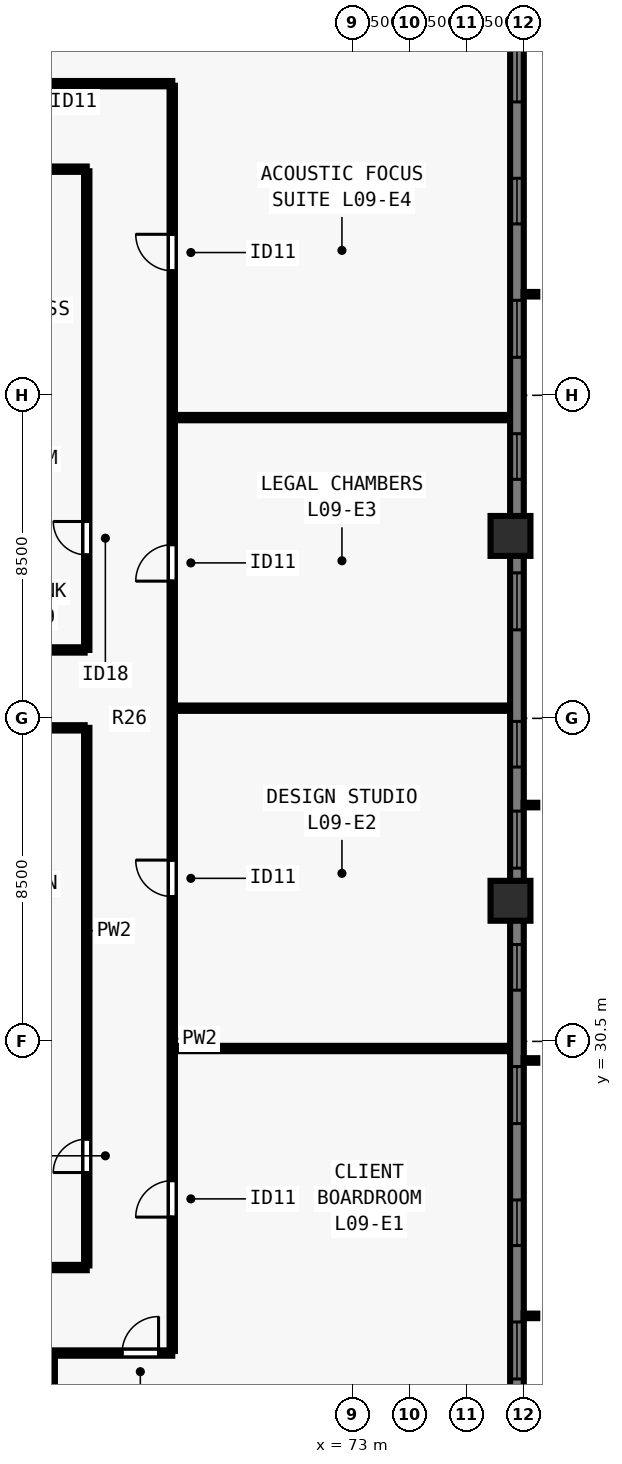
"""IFC4 building model, lengths in metres.
Left out: names, types, materials, properties, quantities, classifications, styles, units other than length and angle.
Written with IfcOpenShell. Run it as: python <this file> out.ifc"""

import sys

from ifc_helpers import new_model, si_unit, direction, frame, frame_2d, origin, origin_2d, place, context, subcontext, project, spatial, rectangle, extrude, element, fill, save


model = new_model("IFC4")
c1 = context("Model", 3, precision=1e-05, world=origin(), true_north=direction((0.0, 1.0)))
c2 = subcontext(c1, "Body", "Model", "MODEL_VIEW")
j1 = project(units=[si_unit("LENGTHUNIT", "METRE"), si_unit("PLANEANGLEUNIT", "RADIAN")], contexts=[c1])
p1 = place(None, origin())
s1 = spatial("IfcSite", under=j1, at=p1, CompositionType="ELEMENT")
p2 = place(p1, origin())
s2 = spatial("IfcBuilding", under=s1, at=p2, CompositionType="ELEMENT")
p3 = place(p2, frame((0.0, 0.0, 37.5)))
s3 = spatial("IfcBuildingStorey", under=s2, at=p3, CompositionType="ELEMENT", Elevation=37.5)
for number, where, z_axis, x_axis in (
    (1, (77.15, 34.2, 0.0), (0.0, 0.0, 1.0), (0.0, 1.0, 0.0)),
    (2, (77.15, 43.8, 0.0), (0.0, 0.0, 1.0), (0.0, 1.0, 0.0)),
):
    element("IfcColumn", number, at=place(p3, frame(where, z_axis=z_axis, x_axis=x_axis)), inside=s3, PredefinedType="COLUMN", context=c2, shape_type="SweptSolid", body=[
        extrude(rectangle(XDim=1.05, YDim=1.05, at=origin_2d()), origin(), (0.0, 0.0, 1.0), 3.5),
    ])
p4 = place(p3, frame((77.32, 61.5, 0.0), z_axis=(0.0, 0.0, 1.0), x_axis=(0.0, -1.0, 0.0)))
e3 = element("IfcWall", 3, at=p4, inside=s3, PredefinedType="SOLIDWALL", context=c2, shape_type="SweptSolid", body=[
    extrude(rectangle(XDim=44.662, YDim=0.36, at=frame_2d((22.331, 0.0))), origin(), (0.0, 0.0, 1.0), 3.28),
])
p5 = place(p4, frame((4.78, 0.0, 0.8)))
e4 = element("IfcOpeningElement", 4, at=p5, cuts=e3, PredefinedType="OPENING", context=c2, shape_type="SweptSolid", body=[
    extrude(rectangle(XDim=1.5, YDim=1.544, at=frame_2d((0.75, 0.772))), frame((0.0, 0.19, 0.0), z_axis=(0.0, -1.0, 0.0), x_axis=(1.0, 0.0, 0.0)), (0.0, 0.0, 1.0), 0.38),
])
p6 = place(p4, frame((8.29, 0.0, 0.8)))
e5 = element("IfcOpeningElement", 5, at=p6, cuts=e3, PredefinedType="OPENING", context=c2, shape_type="SweptSolid", body=[
    extrude(rectangle(XDim=1.2, YDim=1.544, at=frame_2d((0.6, 0.772))), frame((0.0, 0.19, 0.0), z_axis=(0.0, -1.0, 0.0), x_axis=(1.0, 0.0, 0.0)), (0.0, 0.0, 1.0), 0.38),
])
p7 = place(p4, frame((11.5, 0.0, 0.8)))
e6 = element("IfcOpeningElement", 6, at=p7, cuts=e3, PredefinedType="OPENING", context=c2, shape_type="SweptSolid", body=[
    extrude(rectangle(XDim=1.5, YDim=1.544, at=frame_2d((0.75, 0.772))), frame((0.0, 0.19, 0.0), z_axis=(0.0, -1.0, 0.0), x_axis=(1.0, 0.0, 0.0)), (0.0, 0.0, 1.0), 0.38),
])
p8 = place(p4, frame((15.01, 0.0, 0.8)))
e7 = element("IfcOpeningElement", 7, at=p8, cuts=e3, PredefinedType="OPENING", context=c2, shape_type="SweptSolid", body=[
    extrude(rectangle(XDim=1.2, YDim=1.544, at=frame_2d((0.6, 0.772))), frame((0.0, 0.19, 0.0), z_axis=(0.0, -1.0, 0.0), x_axis=(1.0, 0.0, 0.0)), (0.0, 0.0, 1.0), 0.38),
])
p9 = place(p4, frame((18.671, 0.0, 0.8)))
e8 = element("IfcOpeningElement", 8, at=p9, cuts=e3, PredefinedType="OPENING", context=c2, shape_type="SweptSolid", body=[
    extrude(rectangle(XDim=1.5, YDim=1.544, at=frame_2d((0.75, 0.772))), frame((0.0, 0.19, 0.0), z_axis=(0.0, -1.0, 0.0), x_axis=(1.0, 0.0, 0.0)), (0.0, 0.0, 1.0), 0.38),
])
p10 = place(p4, frame((22.581, 0.0, 0.8)))
e9 = element("IfcOpeningElement", 9, at=p10, cuts=e3, PredefinedType="OPENING", context=c2, shape_type="SweptSolid", body=[
    extrude(rectangle(XDim=1.2, YDim=1.544, at=frame_2d((0.6, 0.772))), frame((0.0, 0.19, 0.0), z_axis=(0.0, -1.0, 0.0), x_axis=(1.0, 0.0, 0.0)), (0.0, 0.0, 1.0), 0.38),
])
p11 = place(p4, frame((24.941, 0.0, 0.8)))
e10 = element("IfcOpeningElement", 10, at=p11, cuts=e3, PredefinedType="OPENING", context=c2, shape_type="SweptSolid", body=[
    extrude(rectangle(XDim=1.5, YDim=1.544, at=frame_2d((0.75, 0.772))), frame((0.0, 0.19, 0.0), z_axis=(0.0, -1.0, 0.0), x_axis=(1.0, 0.0, 0.0)), (0.0, 0.0, 1.0), 0.38),
])
p12 = place(p4, frame((28.451, 0.0, 0.8)))
e11 = element("IfcOpeningElement", 11, at=p12, cuts=e3, PredefinedType="OPENING", context=c2, shape_type="SweptSolid", body=[
    extrude(rectangle(XDim=1.2, YDim=1.544, at=frame_2d((0.6, 0.772))), frame((0.0, 0.19, 0.0), z_axis=(0.0, -1.0, 0.0), x_axis=(1.0, 0.0, 0.0)), (0.0, 0.0, 1.0), 0.38),
])
p13 = place(p4, frame((31.662, 0.0, 0.8)))
e12 = element("IfcOpeningElement", 12, at=p13, cuts=e3, PredefinedType="OPENING", context=c2, shape_type="SweptSolid", body=[
    extrude(rectangle(XDim=1.5, YDim=1.544, at=frame_2d((0.75, 0.772))), frame((0.0, 0.19, 0.0), z_axis=(0.0, -1.0, 0.0), x_axis=(1.0, 0.0, 0.0)), (0.0, 0.0, 1.0), 0.38),
])
p14 = place(p4, frame((35.172, 0.0, 0.8)))
e13 = element("IfcOpeningElement", 13, at=p14, cuts=e3, PredefinedType="OPENING", context=c2, shape_type="SweptSolid", body=[
    extrude(rectangle(XDim=1.2, YDim=1.544, at=frame_2d((0.6, 0.772))), frame((0.0, 0.19, 0.0), z_axis=(0.0, -1.0, 0.0), x_axis=(1.0, 0.0, 0.0)), (0.0, 0.0, 1.0), 0.38),
])
p15 = place(p4, frame((38.382, 0.0, 0.8)))
e14 = element("IfcOpeningElement", 14, at=p15, cuts=e3, PredefinedType="OPENING", context=c2, shape_type="SweptSolid", body=[
    extrude(rectangle(XDim=1.5, YDim=1.544, at=frame_2d((0.75, 0.772))), frame((0.0, 0.19, 0.0), z_axis=(0.0, -1.0, 0.0), x_axis=(1.0, 0.0, 0.0)), (0.0, 0.0, 1.0), 0.38),
])
p16 = place(p3, frame((35.75, 22.3, 0.0), z_axis=(0.0, 0.0, 1.0), x_axis=(1.0, 0.0, 0.0)))
e15 = element("IfcWall", 15, at=p16, inside=s3, PredefinedType="PARTITIONING", context=c2, shape_type="SweptSolid", body=[
    extrude(rectangle(XDim=32.5, YDim=0.14, at=frame_2d((16.25, 0.0))), origin(), (0.0, 0.0, 1.0), 3.28),
])
p17 = place(p16, frame((1.604, 0.0, 0.0)))
e16 = element("IfcOpeningElement", 16, at=p17, cuts=e15, PredefinedType="OPENING", context=c2, shape_type="SweptSolid", body=[
    extrude(rectangle(XDim=0.96, YDim=2.12, at=frame_2d((0.48, 1.06))), frame((0.0, 0.08, 0.0), z_axis=(0.0, -1.0, 0.0), x_axis=(1.0, 0.0, 0.0)), (0.0, 0.0, 1.0), 0.16),
])
p18 = place(p16, frame((9.585, 0.0, 0.0)))
e17 = element("IfcOpeningElement", 17, at=p18, cuts=e15, PredefinedType="OPENING", context=c2, shape_type="SweptSolid", body=[
    extrude(rectangle(XDim=0.96, YDim=2.12, at=frame_2d((0.48, 1.06))), frame((0.0, 0.08, 0.0), z_axis=(0.0, -1.0, 0.0), x_axis=(1.0, 0.0, 0.0)), (0.0, 0.0, 1.0), 0.16),
])
p19 = place(p16, frame((22.125, 0.0, 0.0)))
e18 = element("IfcOpeningElement", 18, at=p19, cuts=e15, PredefinedType="OPENING", context=c2, shape_type="SweptSolid", body=[
    extrude(rectangle(XDim=0.96, YDim=2.12, at=frame_2d((0.48, 1.06))), frame((0.0, 0.08, 0.0), z_axis=(0.0, -1.0, 0.0), x_axis=(1.0, 0.0, 0.0)), (0.0, 0.0, 1.0), 0.16),
])
p20 = place(p16, frame((31.18, 0.0, 0.0)))
e19 = element("IfcOpeningElement", 19, at=p20, cuts=e15, PredefinedType="OPENING", context=c2, shape_type="SweptSolid", body=[
    extrude(rectangle(XDim=0.96, YDim=2.12, at=frame_2d((0.48, 1.06))), frame((0.0, 0.08, 0.0), z_axis=(0.0, -1.0, 0.0), x_axis=(1.0, 0.0, 0.0)), (0.0, 0.0, 1.0), 0.16),
])
p21 = place(p3, frame((35.75, 55.7, 0.0), z_axis=(0.0, 0.0, 1.0), x_axis=(1.0, 0.0, 0.0)))
e20 = element("IfcWall", 20, at=p21, inside=s3, PredefinedType="PARTITIONING", context=c2, shape_type="SweptSolid", body=[
    extrude(rectangle(XDim=32.5, YDim=0.14, at=frame_2d((16.25, 0.0))), origin(), (0.0, 0.0, 1.0), 3.28),
])
p22 = place(p21, frame((3.154, 0.0, 0.0)))
e21 = element("IfcOpeningElement", 21, at=p22, cuts=e20, PredefinedType="OPENING", context=c2, shape_type="SweptSolid", body=[
    extrude(rectangle(XDim=0.96, YDim=2.12, at=frame_2d((0.48, 1.06))), frame((0.0, 0.08, 0.0), z_axis=(0.0, -1.0, 0.0), x_axis=(1.0, 0.0, 0.0)), (0.0, 0.0, 1.0), 0.16),
])
p23 = place(p21, frame((27.834, 0.0, 0.0)))
e22 = element("IfcOpeningElement", 22, at=p23, cuts=e20, PredefinedType="OPENING", context=c2, shape_type="SweptSolid", body=[
    extrude(rectangle(XDim=0.96, YDim=2.12, at=frame_2d((0.48, 1.06))), frame((0.0, 0.08, 0.0), z_axis=(0.0, -1.0, 0.0), x_axis=(1.0, 0.0, 0.0)), (0.0, 0.0, 1.0), 0.16),
])
p24 = place(p3, frame((68.25, 22.355, 0.0), z_axis=(0.0, 0.0, 1.0), x_axis=(0.0, 1.0, 0.0)))
e23 = element("IfcWall", 23, at=p24, inside=s3, PredefinedType="PARTITIONING", context=c2, shape_type="SweptSolid", body=[
    extrude(rectangle(XDim=33.29, YDim=0.14, at=frame_2d((16.645, 0.0))), origin(), (0.0, 0.0, 1.0), 3.28),
])
p25 = place(p24, frame((3.522, 0.0, 0.0)))
e24 = element("IfcOpeningElement", 24, at=p25, cuts=e23, PredefinedType="OPENING", context=c2, shape_type="SweptSolid", body=[
    extrude(rectangle(XDim=0.96, YDim=2.12, at=frame_2d((0.48, 1.06))), frame((0.0, 0.08, 0.0), z_axis=(0.0, -1.0, 0.0), x_axis=(1.0, 0.0, 0.0)), (0.0, 0.0, 1.0), 0.16),
])
p26 = place(p24, frame((11.956, 0.0, 0.0)))
e25 = element("IfcOpeningElement", 25, at=p26, cuts=e23, PredefinedType="OPENING", context=c2, shape_type="SweptSolid", body=[
    extrude(rectangle(XDim=0.96, YDim=2.12, at=frame_2d((0.48, 1.06))), frame((0.0, 0.08, 0.0), z_axis=(0.0, -1.0, 0.0), x_axis=(1.0, 0.0, 0.0)), (0.0, 0.0, 1.0), 0.16),
])
p27 = place(p24, frame((20.256, 0.0, 0.0)))
e26 = element("IfcOpeningElement", 26, at=p27, cuts=e23, PredefinedType="OPENING", context=c2, shape_type="SweptSolid", body=[
    extrude(rectangle(XDim=0.96, YDim=2.12, at=frame_2d((0.48, 1.06))), frame((0.0, 0.08, 0.0), z_axis=(0.0, -1.0, 0.0), x_axis=(1.0, 0.0, 0.0)), (0.0, 0.0, 1.0), 0.16),
])
p28 = place(p24, frame((28.422, 0.0, 0.0)))
e27 = element("IfcOpeningElement", 27, at=p28, cuts=e23, PredefinedType="OPENING", context=c2, shape_type="SweptSolid", body=[
    extrude(rectangle(XDim=0.96, YDim=2.12, at=frame_2d((0.48, 1.06))), frame((0.0, 0.08, 0.0), z_axis=(0.0, -1.0, 0.0), x_axis=(1.0, 0.0, 0.0)), (0.0, 0.0, 1.0), 0.16),
])
p29 = place(p3, frame((38.0, 24.55, 0.0), z_axis=(0.0, 0.0, 1.0), x_axis=(1.0, 0.0, 0.0)))
e28 = element("IfcWall", 28, at=p29, inside=s3, PredefinedType="PARTITIONING", context=c2, shape_type="SweptSolid", body=[
    extrude(rectangle(XDim=28.0, YDim=0.14, at=frame_2d((14.0, 0.0))), origin(), (0.0, 0.0, 1.0), 3.28),
])
p30 = place(p29, frame((1.2, 0.0, 0.0)))
e29 = element("IfcOpeningElement", 29, at=p30, cuts=e28, PredefinedType="OPENING", context=c2, shape_type="SweptSolid", body=[
    extrude(rectangle(XDim=0.88, YDim=2.1, at=frame_2d((0.44, 1.05))), frame((0.0, 0.08, 0.0), z_axis=(0.0, -1.0, 0.0), x_axis=(1.0, 0.0, 0.0)), (0.0, 0.0, 1.0), 0.16),
])
p31 = place(p29, frame((10.5, 0.0, 0.0)))
e30 = element("IfcOpeningElement", 30, at=p31, cuts=e28, PredefinedType="OPENING", context=c2, shape_type="SweptSolid", body=[
    extrude(rectangle(XDim=0.88, YDim=2.1, at=frame_2d((0.44, 1.05))), frame((0.0, 0.08, 0.0), z_axis=(0.0, -1.0, 0.0), x_axis=(1.0, 0.0, 0.0)), (0.0, 0.0, 1.0), 0.16),
])
p32 = place(p29, frame((21.0, 0.0, 0.0)))
e31 = element("IfcOpeningElement", 31, at=p32, cuts=e28, PredefinedType="OPENING", context=c2, shape_type="SweptSolid", body=[
    extrude(rectangle(XDim=0.88, YDim=2.1, at=frame_2d((0.44, 1.05))), frame((0.0, 0.08, 0.0), z_axis=(0.0, -1.0, 0.0), x_axis=(1.0, 0.0, 0.0)), (0.0, 0.0, 1.0), 0.16),
])
p33 = place(p3, frame((38.0, 53.45, 0.0), z_axis=(0.0, 0.0, 1.0), x_axis=(1.0, 0.0, 0.0)))
e32 = element("IfcWall", 32, at=p33, inside=s3, PredefinedType="PARTITIONING", context=c2, shape_type="SweptSolid", body=[
    extrude(rectangle(XDim=28.0, YDim=0.14, at=frame_2d((14.0, 0.0))), origin(), (0.0, 0.0, 1.0), 3.28),
])
p34 = place(p33, frame((2.2, 0.0, 0.0)))
e33 = element("IfcOpeningElement", 33, at=p34, cuts=e32, PredefinedType="OPENING", context=c2, shape_type="SweptSolid", body=[
    extrude(rectangle(XDim=0.88, YDim=2.1, at=frame_2d((0.44, 1.05))), frame((0.0, 0.08, 0.0), z_axis=(0.0, -1.0, 0.0), x_axis=(1.0, 0.0, 0.0)), (0.0, 0.0, 1.0), 0.16),
])
p35 = place(p33, frame((14.5, 0.0, 0.0)))
e34 = element("IfcOpeningElement", 34, at=p35, cuts=e32, PredefinedType="OPENING", context=c2, shape_type="SweptSolid", body=[
    extrude(rectangle(XDim=0.88, YDim=2.1, at=frame_2d((0.44, 1.05))), frame((0.0, 0.08, 0.0), z_axis=(0.0, -1.0, 0.0), x_axis=(1.0, 0.0, 0.0)), (0.0, 0.0, 1.0), 0.16),
])
p36 = place(p33, frame((24.0, 0.0, 0.0)))
e35 = element("IfcOpeningElement", 35, at=p36, cuts=e32, PredefinedType="OPENING", context=c2, shape_type="SweptSolid", body=[
    extrude(rectangle(XDim=0.88, YDim=2.1, at=frame_2d((0.44, 1.05))), frame((0.0, 0.08, 0.0), z_axis=(0.0, -1.0, 0.0), x_axis=(1.0, 0.0, 0.0)), (0.0, 0.0, 1.0), 0.16),
])
p37 = place(p3, frame((66.0, 24.605, 0.0), z_axis=(0.0, 0.0, 1.0), x_axis=(0.0, 1.0, 0.0)))
e36 = element("IfcWall", 36, at=p37, inside=s3, PredefinedType="PARTITIONING", context=c2, shape_type="SweptSolid", body=[
    extrude(rectangle(XDim=14.145, YDim=0.14, at=frame_2d((7.073, 0.0))), origin(), (0.0, 0.0, 1.0), 3.28),
])
p38 = place(p37, frame((2.445, 0.0, 0.0)))
e37 = element("IfcOpeningElement", 37, at=p38, cuts=e36, PredefinedType="OPENING", context=c2, shape_type="SweptSolid", body=[
    extrude(rectangle(XDim=0.88, YDim=2.1, at=frame_2d((0.44, 1.05))), frame((0.0, 0.08, 0.0), z_axis=(0.0, -1.0, 0.0), x_axis=(1.0, 0.0, 0.0)), (0.0, 0.0, 1.0), 0.16),
])
p39 = place(p3, frame((66.0, 40.8, 0.0), z_axis=(0.0, 0.0, 1.0), x_axis=(0.0, 1.0, 0.0)))
e38 = element("IfcWall", 38, at=p39, inside=s3, PredefinedType="PARTITIONING", context=c2, shape_type="SweptSolid", body=[
    extrude(rectangle(XDim=12.595, YDim=0.14, at=frame_2d((6.297, 0.0))), origin(), (0.0, 0.0, 1.0), 3.28),
])
p40 = place(p39, frame((2.5, 0.0, 0.0)))
e39 = element("IfcOpeningElement", 39, at=p40, cuts=e38, PredefinedType="OPENING", context=c2, shape_type="SweptSolid", body=[
    extrude(rectangle(XDim=0.88, YDim=2.1, at=frame_2d((0.44, 1.05))), frame((0.0, 0.08, 0.0), z_axis=(0.0, -1.0, 0.0), x_axis=(1.0, 0.0, 0.0)), (0.0, 0.0, 1.0), 0.16),
])
for number, where, z_axis, x_axis in (
    (40, (60.76, 38.75, 0.0), (0.0, 0.0, 1.0), (1.0, 0.0, 0.0)),
    (41, (60.76, 40.8, 0.0), (0.0, 0.0, 1.0), (1.0, 0.0, 0.0)),
):
    element("IfcWall", number, at=place(p3, frame(where, z_axis=z_axis, x_axis=x_axis)), inside=s3, PredefinedType="PARTITIONING", context=c2, shape_type="SweptSolid", body=[
        extrude(rectangle(XDim=5.185, YDim=0.14, at=frame_2d((2.593, 0.0))), origin(), (0.0, 0.0, 1.0), 3.28),
    ])
p41 = place(p3, frame((65.093, 13.92, 0.0), z_axis=(0.0, 0.0, 1.0), x_axis=(0.0, 1.0, 0.0)))
e42 = element("IfcWall", 42, at=p41, inside=s3, PredefinedType="PARTITIONING", context=c2, shape_type="SweptSolid", body=[
    extrude(rectangle(XDim=8.28, YDim=0.14, at=frame_2d((4.14, 0.0))), origin(), (0.0, 0.0, 1.0), 3.28),
])
for number, where, z_axis, x_axis in (
    (43, (68.35, 30.313, 0.0), (0.0, 0.0, 1.0), (1.0, 0.0, 0.0)),
    (44, (68.35, 39.268, 0.0), (0.0, 0.0, 1.0), (1.0, 0.0, 0.0)),
    (45, (68.35, 46.913, 0.0), (0.0, 0.0, 1.0), (1.0, 0.0, 0.0)),
):
    element("IfcWall", number, at=place(p3, frame(where, z_axis=z_axis, x_axis=x_axis)), inside=s3, PredefinedType="PARTITIONING", context=c2, shape_type="SweptSolid", body=[
        extrude(rectangle(XDim=8.73, YDim=0.14, at=frame_2d((4.365, 0.0))), origin(), (0.0, 0.0, 1.0), 3.28),
    ])
p42 = place(p5, origin())
e46 = element("IfcWindow", 46, at=p42, inside=s3, PartitioningType="SINGLE_PANEL", PredefinedType="WINDOW", context=c2, shape_type="SweptSolid", body=[
    extrude(rectangle(XDim=1.5, YDim=1.544, at=frame_2d((0.75, 0.772))), frame((0.0, -0.05, 0.0), z_axis=(0.0, -1.0, 0.0), x_axis=(1.0, 0.0, 0.0)), (0.0, 0.0, 1.0), 0.06),
])
fill(e4, e46)
p43 = place(p6, origin())
e47 = element("IfcWindow", 47, at=p43, inside=s3, PartitioningType="SINGLE_PANEL", PredefinedType="WINDOW", context=c2, shape_type="SweptSolid", body=[
    extrude(rectangle(XDim=1.2, YDim=1.544, at=frame_2d((0.6, 0.772))), frame((0.0, -0.05, 0.0), z_axis=(0.0, -1.0, 0.0), x_axis=(1.0, 0.0, 0.0)), (0.0, 0.0, 1.0), 0.06),
])
fill(e5, e47)
p44 = place(p7, origin())
e48 = element("IfcWindow", 48, at=p44, inside=s3, PartitioningType="SINGLE_PANEL", PredefinedType="WINDOW", context=c2, shape_type="SweptSolid", body=[
    extrude(rectangle(XDim=1.5, YDim=1.544, at=frame_2d((0.75, 0.772))), frame((0.0, -0.05, 0.0), z_axis=(0.0, -1.0, 0.0), x_axis=(1.0, 0.0, 0.0)), (0.0, 0.0, 1.0), 0.06),
])
fill(e6, e48)
p45 = place(p8, origin())
e49 = element("IfcWindow", 49, at=p45, inside=s3, PartitioningType="SINGLE_PANEL", PredefinedType="WINDOW", context=c2, shape_type="SweptSolid", body=[
    extrude(rectangle(XDim=1.2, YDim=1.544, at=frame_2d((0.6, 0.772))), frame((0.0, -0.05, 0.0), z_axis=(0.0, -1.0, 0.0), x_axis=(1.0, 0.0, 0.0)), (0.0, 0.0, 1.0), 0.06),
])
fill(e7, e49)
p46 = place(p9, origin())
e50 = element("IfcWindow", 50, at=p46, inside=s3, PartitioningType="SINGLE_PANEL", PredefinedType="WINDOW", context=c2, shape_type="SweptSolid", body=[
    extrude(rectangle(XDim=1.5, YDim=1.544, at=frame_2d((0.75, 0.772))), frame((0.0, -0.05, 0.0), z_axis=(0.0, -1.0, 0.0), x_axis=(1.0, 0.0, 0.0)), (0.0, 0.0, 1.0), 0.06),
])
fill(e8, e50)
p47 = place(p10, origin())
e51 = element("IfcWindow", 51, at=p47, inside=s3, PartitioningType="SINGLE_PANEL", PredefinedType="WINDOW", context=c2, shape_type="SweptSolid", body=[
    extrude(rectangle(XDim=1.2, YDim=1.544, at=frame_2d((0.6, 0.772))), frame((0.0, -0.05, 0.0), z_axis=(0.0, -1.0, 0.0), x_axis=(1.0, 0.0, 0.0)), (0.0, 0.0, 1.0), 0.06),
])
fill(e9, e51)
p48 = place(p11, origin())
e52 = element("IfcWindow", 52, at=p48, inside=s3, PartitioningType="SINGLE_PANEL", PredefinedType="WINDOW", context=c2, shape_type="SweptSolid", body=[
    extrude(rectangle(XDim=1.5, YDim=1.544, at=frame_2d((0.75, 0.772))), frame((0.0, -0.05, 0.0), z_axis=(0.0, -1.0, 0.0), x_axis=(1.0, 0.0, 0.0)), (0.0, 0.0, 1.0), 0.06),
])
fill(e10, e52)
p49 = place(p12, origin())
e53 = element("IfcWindow", 53, at=p49, inside=s3, PartitioningType="SINGLE_PANEL", PredefinedType="WINDOW", context=c2, shape_type="SweptSolid", body=[
    extrude(rectangle(XDim=1.2, YDim=1.544, at=frame_2d((0.6, 0.772))), frame((0.0, -0.05, 0.0), z_axis=(0.0, -1.0, 0.0), x_axis=(1.0, 0.0, 0.0)), (0.0, 0.0, 1.0), 0.06),
])
fill(e11, e53)
p50 = place(p13, origin())
e54 = element("IfcWindow", 54, at=p50, inside=s3, PartitioningType="SINGLE_PANEL", PredefinedType="WINDOW", context=c2, shape_type="SweptSolid", body=[
    extrude(rectangle(XDim=1.5, YDim=1.544, at=frame_2d((0.75, 0.772))), frame((0.0, -0.05, 0.0), z_axis=(0.0, -1.0, 0.0), x_axis=(1.0, 0.0, 0.0)), (0.0, 0.0, 1.0), 0.06),
])
fill(e12, e54)
p51 = place(p14, origin())
e55 = element("IfcWindow", 55, at=p51, inside=s3, PartitioningType="SINGLE_PANEL", PredefinedType="WINDOW", context=c2, shape_type="SweptSolid", body=[
    extrude(rectangle(XDim=1.2, YDim=1.544, at=frame_2d((0.6, 0.772))), frame((0.0, -0.05, 0.0), z_axis=(0.0, -1.0, 0.0), x_axis=(1.0, 0.0, 0.0)), (0.0, 0.0, 1.0), 0.06),
])
fill(e13, e55)
p52 = place(p15, origin())
e56 = element("IfcWindow", 56, at=p52, inside=s3, PartitioningType="SINGLE_PANEL", PredefinedType="WINDOW", context=c2, shape_type="SweptSolid", body=[
    extrude(rectangle(XDim=1.5, YDim=1.544, at=frame_2d((0.75, 0.772))), frame((0.0, -0.05, 0.0), z_axis=(0.0, -1.0, 0.0), x_axis=(1.0, 0.0, 0.0)), (0.0, 0.0, 1.0), 0.06),
])
fill(e14, e56)
p53 = place(p38, origin())
e57 = element("IfcDoor", 57, at=p53, inside=s3, OperationType="SINGLE_SWING_LEFT", PredefinedType="DOOR", context=c2, shape_type="SweptSolid", body=[
    extrude(rectangle(XDim=0.88, YDim=2.1, at=frame_2d((0.44, 1.05))), frame((0.0, 0.025, 0.0), z_axis=(0.0, -1.0, 0.0), x_axis=(1.0, 0.0, 0.0)), (0.0, 0.0, 1.0), 0.05),
])
fill(e37, e57)
p54 = place(p40, origin())
e58 = element("IfcDoor", 58, at=p54, inside=s3, OperationType="SINGLE_SWING_RIGHT", PredefinedType="DOOR", context=c2, shape_type="SweptSolid", body=[
    extrude(rectangle(XDim=0.88, YDim=2.1, at=frame_2d((0.44, 1.05))), frame((0.0, 0.025, 0.0), z_axis=(0.0, -1.0, 0.0), x_axis=(1.0, 0.0, 0.0)), (0.0, 0.0, 1.0), 0.05),
])
fill(e39, e58)
p55 = place(p20, origin())
e59 = element("IfcDoor", 59, at=p55, inside=s3, OperationType="SINGLE_SWING_RIGHT", PredefinedType="DOOR", context=c2, shape_type="SweptSolid", body=[
    extrude(rectangle(XDim=0.96, YDim=2.12, at=frame_2d((0.48, 1.06))), frame((0.0, 0.025, 0.0), z_axis=(0.0, -1.0, 0.0), x_axis=(1.0, 0.0, 0.0)), (0.0, 0.0, 1.0), 0.05),
])
fill(e19, e59)
p56 = place(p25, origin())
e60 = element("IfcDoor", 60, at=p56, inside=s3, OperationType="SINGLE_SWING_LEFT", PredefinedType="DOOR", context=c2, shape_type="SweptSolid", body=[
    extrude(rectangle(XDim=0.96, YDim=2.12, at=frame_2d((0.48, 1.06))), frame((0.0, 0.025, 0.0), z_axis=(0.0, -1.0, 0.0), x_axis=(1.0, 0.0, 0.0)), (0.0, 0.0, 1.0), 0.05),
])
fill(e24, e60)
p57 = place(p26, origin())
e61 = element("IfcDoor", 61, at=p57, inside=s3, OperationType="SINGLE_SWING_RIGHT", PredefinedType="DOOR", context=c2, shape_type="SweptSolid", body=[
    extrude(rectangle(XDim=0.96, YDim=2.12, at=frame_2d((0.48, 1.06))), frame((0.0, 0.025, 0.0), z_axis=(0.0, -1.0, 0.0), x_axis=(1.0, 0.0, 0.0)), (0.0, 0.0, 1.0), 0.05),
])
fill(e25, e61)
p58 = place(p27, origin())
e62 = element("IfcDoor", 62, at=p58, inside=s3, OperationType="SINGLE_SWING_LEFT", PredefinedType="DOOR", context=c2, shape_type="SweptSolid", body=[
    extrude(rectangle(XDim=0.96, YDim=2.12, at=frame_2d((0.48, 1.06))), frame((0.0, 0.025, 0.0), z_axis=(0.0, -1.0, 0.0), x_axis=(1.0, 0.0, 0.0)), (0.0, 0.0, 1.0), 0.05),
])
fill(e26, e62)
p59 = place(p28, origin())
e63 = element("IfcDoor", 63, at=p59, inside=s3, OperationType="SINGLE_SWING_RIGHT", PredefinedType="DOOR", context=c2, shape_type="SweptSolid", body=[
    extrude(rectangle(XDim=0.96, YDim=2.12, at=frame_2d((0.48, 1.06))), frame((0.0, 0.025, 0.0), z_axis=(0.0, -1.0, 0.0), x_axis=(1.0, 0.0, 0.0)), (0.0, 0.0, 1.0), 0.05),
])
fill(e27, e63)
save(model, sys.argv[1])
